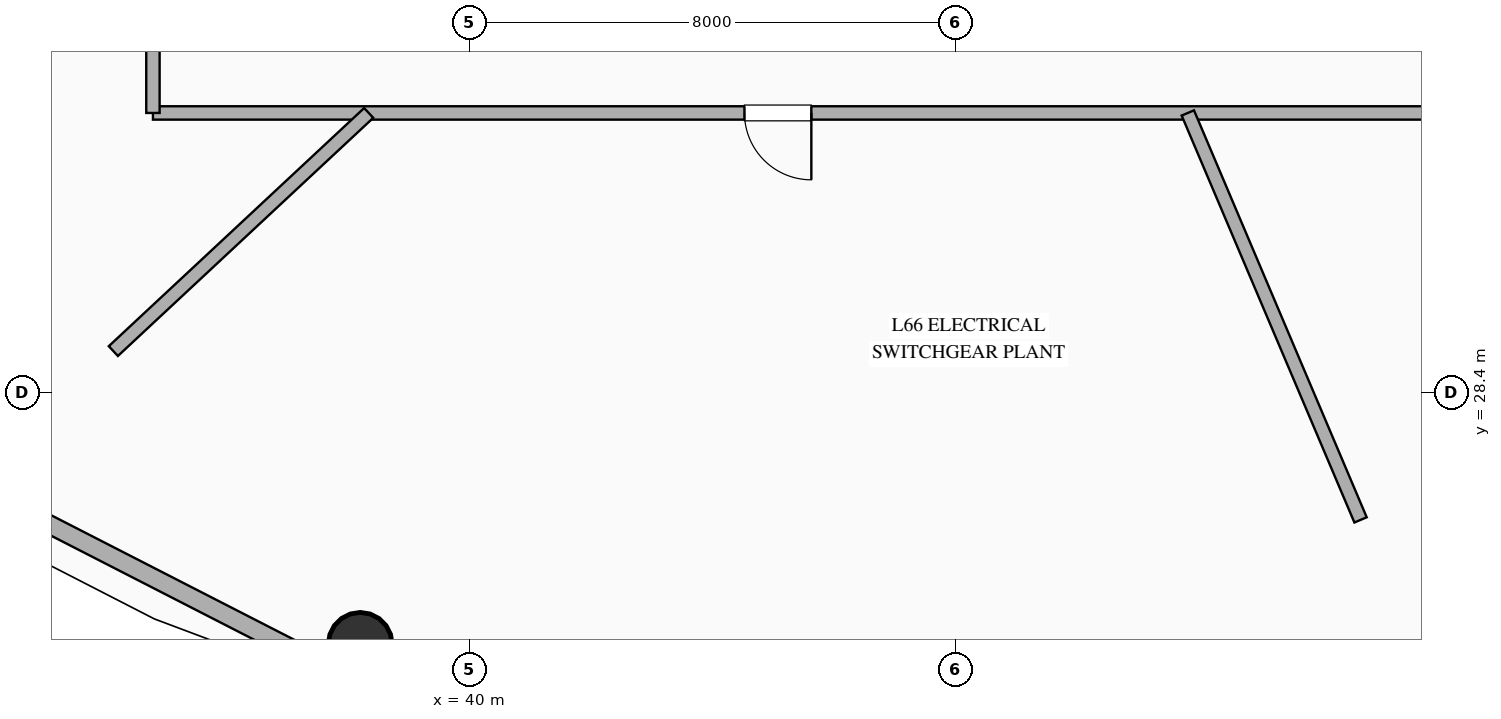
"""IFC4 building model, lengths in metres.
Left out: names, types, materials, properties, quantities, classifications, styles, units other than length and angle.
Written with IfcOpenShell. Run it as: python <this file> out.ifc"""

import sys

from ifc_helpers import new_model, si_unit, direction, frame, frame_2d, origin, origin_2d, place, context, subcontext, project, spatial, rectangle, hollow_circle, extrude, element, fill, save


model = new_model("IFC4")
c1 = context("Model", 3, precision=1e-05, world=origin(), true_north=direction((0.0, 1.0)))
c2 = subcontext(c1, "Body", "Model", "MODEL_VIEW")
j1 = project(units=[si_unit("LENGTHUNIT", "METRE"), si_unit("PLANEANGLEUNIT", "RADIAN")], contexts=[c1])
p1 = place(None, origin())
s1 = spatial("IfcSite", under=j1, at=p1, CompositionType="ELEMENT")
p2 = place(p1, origin())
s2 = spatial("IfcBuilding", under=s1, at=p2, CompositionType="ELEMENT")
p3 = place(p2, frame((0.0, 0.0, 256.8)))
s3 = spatial("IfcBuildingStorey", under=s2, at=p3, CompositionType="ELEMENT", Elevation=256.8)
p4 = place(p3, frame((38.209, 24.261, 0.0), z_axis=(0.0, 0.0, 1.0), x_axis=(1.0, 0.0, 0.0)))
e1 = element("IfcColumn", 1, at=p4, inside=s3, PredefinedType="COLUMN", context=c2, shape_type="SweptSolid", body=[
    extrude(hollow_circle(Radius=0.525, WallThickness=0.028, at=origin_2d()), origin(), (0.0, 0.0, 1.0), 5.17),
])
p5 = place(p3, frame((29.617, 28.013, 0.0), z_axis=(0.0, 0.0, 1.0), x_axis=(0.890007394051, -0.455946091699, 0.0)))
e2 = element("IfcWall", 2, at=p5, inside=s3, PredefinedType="SOLIDWALL", context=c2, shape_type="SweptSolid", body=[
    extrude(rectangle(XDim=9.404, YDim=0.3, at=frame_2d((4.702, 0.0))), origin(), (0.0, 0.0, 1.0), 5.17),
])
p6 = place(p3, frame((61.2, 33.0, 0.0), z_axis=(0.0, 0.0, 1.0), x_axis=(-1.0, 0.0, 0.0)))
e3 = element("IfcWall", 3, at=p6, inside=s3, PredefinedType="SOLIDWALL", context=c2, shape_type="SweptSolid", body=[
    extrude(rectangle(XDim=26.4, YDim=0.22, at=frame_2d((13.2, 0.0))), origin(), (0.0, 0.0, 1.0), 3.47),
])
p7 = place(p6, frame((15.572, 0.0, 0.0)))
e4 = element("IfcOpeningElement", 4, at=p7, cuts=e3, PredefinedType="OPENING", context=c2, shape_type="SweptSolid", body=[
    extrude(rectangle(XDim=1.1, YDim=2.15, at=frame_2d((0.55, 1.075))), frame((0.0, 0.12, 0.0), z_axis=(0.0, -1.0, 0.0), x_axis=(1.0, 0.0, 0.0)), (0.0, 0.0, 1.0), 0.24),
])
p8 = place(p6, frame((4.157, 0.0, 0.0)))
e5 = element("IfcOpeningElement", 5, at=p8, cuts=e3, PredefinedType="OPENING", context=c2, shape_type="SweptSolid", body=[
    extrude(rectangle(XDim=1.1, YDim=2.15, at=frame_2d((0.55, 1.075))), frame((0.0, 0.12, 0.0), z_axis=(0.0, -1.0, 0.0), x_axis=(1.0, 0.0, 0.0)), (0.0, 0.0, 1.0), 0.24),
])
p9 = place(p3, frame((34.8, 33.0, 0.0), z_axis=(0.0, 0.0, 1.0), x_axis=(0.0, 1.0, 0.0)))
e6 = element("IfcWall", 6, at=p9, inside=s3, PredefinedType="SOLIDWALL", context=c2, shape_type="SweptSolid", body=[
    extrude(rectangle(XDim=18.0, YDim=0.22, at=frame_2d((9.0, 0.0))), origin(), (0.0, 0.0, 1.0), 3.47),
])
p10 = place(p9, frame((4.777, 0.0, 0.0)))
e7 = element("IfcOpeningElement", 7, at=p10, cuts=e6, PredefinedType="OPENING", context=c2, shape_type="SweptSolid", body=[
    extrude(rectangle(XDim=1.1, YDim=2.15, at=frame_2d((0.55, 1.075))), frame((0.0, 0.12, 0.0), z_axis=(0.0, -1.0, 0.0), x_axis=(1.0, 0.0, 0.0)), (0.0, 0.0, 1.0), 0.24),
])
p11 = place(p3, frame((54.661, 26.308, 0.0), z_axis=(0.0, 0.0, 1.0), x_axis=(-0.390711106483, 0.920513352033, 0.0)))
e8 = element("IfcWall", 8, at=p11, inside=s3, PredefinedType="SOLIDWALL", context=c2, shape_type="SweptSolid", body=[
    extrude(rectangle(XDim=7.27, YDim=0.22, at=frame_2d((3.635, 0.0))), origin(), (0.0, 0.0, 1.0), 3.47),
])
p12 = place(p3, frame((34.149, 29.084, 0.0), z_axis=(0.0, 0.0, 1.0), x_axis=(0.731356342023, 0.681995528566, 0.0)))
e9 = element("IfcWall", 9, at=p12, inside=s3, PredefinedType="SOLIDWALL", context=c2, shape_type="SweptSolid", body=[
    extrude(rectangle(XDim=5.742, YDim=0.22, at=frame_2d((2.871, 0.0))), origin(), (0.0, 0.0, 1.0), 3.47),
])
p13 = place(p7, origin())
e10 = element("IfcDoor", 10, at=p13, inside=s3, OperationType="SINGLE_SWING_LEFT", PredefinedType="DOOR", context=c2, shape_type="SweptSolid", body=[
    extrude(rectangle(XDim=1.1, YDim=2.15, at=frame_2d((0.55, 1.075))), frame((0.0, 0.025, 0.0), z_axis=(0.0, -1.0, 0.0), x_axis=(1.0, 0.0, 0.0)), (0.0, 0.0, 1.0), 0.05),
])
fill(e4, e10)
save(model, sys.argv[1])
